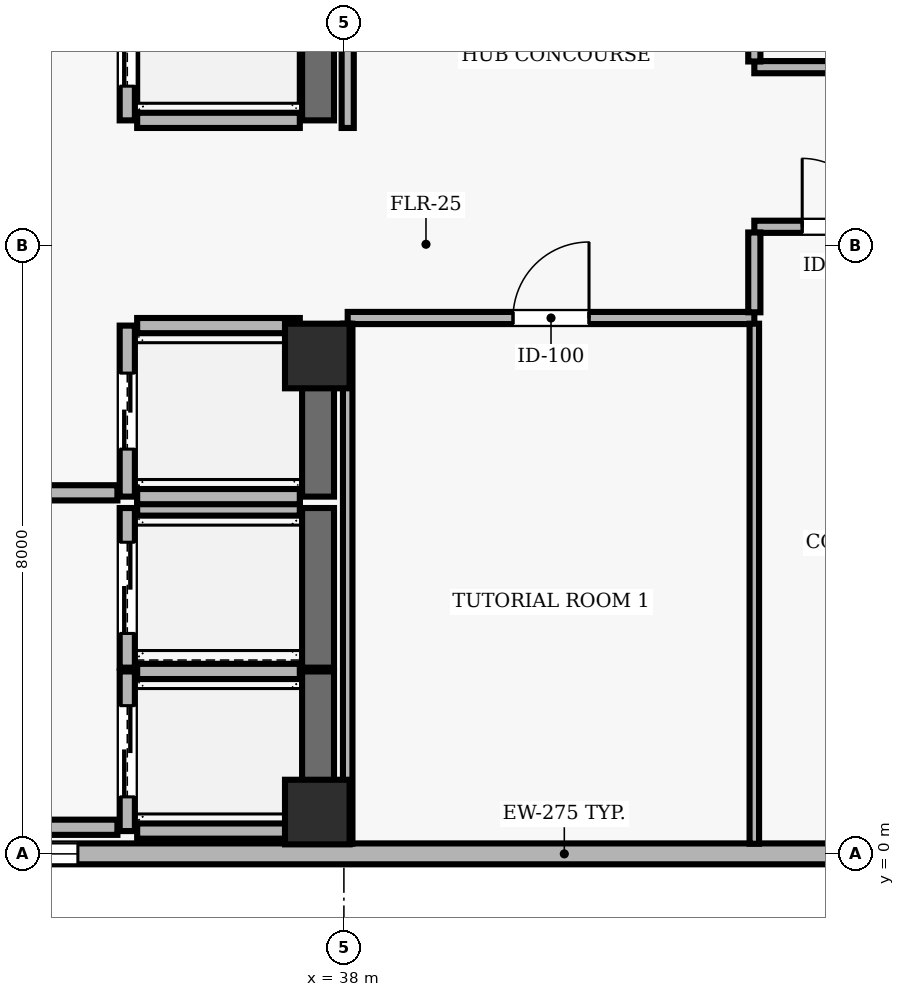
"""IFC4 building model, lengths in metres.
Left out: names, types, materials, properties, quantities, classifications, styles, units other than length and angle.
Written with IfcOpenShell. Run it as: python <this file> out.ifc"""

import sys

from ifc_helpers import new_model, si_unit, direction, frame, frame_2d, origin, origin_2d, place, context, subcontext, project, spatial, rectangle, extrude, element, fill, save


model = new_model("IFC4")
c1 = context("Model", 3, precision=1e-05, world=origin(), true_north=direction((0.0, 1.0)))
c2 = subcontext(c1, "Body", "Model", "MODEL_VIEW")
j1 = project(units=[si_unit("LENGTHUNIT", "METRE"), si_unit("PLANEANGLEUNIT", "RADIAN")], contexts=[c1])
p1 = place(None, origin())
s1 = spatial("IfcSite", under=j1, at=p1, CompositionType="ELEMENT")
p2 = place(p1, origin())
s2 = spatial("IfcBuilding", under=s1, at=p2, CompositionType="ELEMENT")
p3 = place(p2, frame((0.0, 0.0, 302.8)))
s3 = spatial("IfcBuildingStorey", under=s2, at=p3, CompositionType="ELEMENT", Elevation=302.8)
for number, where, z_axis, x_axis in (
    (1, (37.65, 0.55, 0.0), (0.0, 0.0, 1.0), (1.0, 0.0, 0.0)),
    (2, (37.65, 6.55, 0.0), (0.0, 0.0, 1.0), (1.0, 0.0, 0.0)),
):
    element("IfcColumn", number, at=place(p3, frame(where, z_axis=z_axis, x_axis=x_axis)), inside=s3, PredefinedType="COLUMN", context=c2, shape_type="SweptSolid", body=[
        extrude(rectangle(XDim=0.85, YDim=0.85, at=origin_2d()), origin(), (0.0, 0.0, 1.0), 3.9),
    ])
p4 = place(p3, frame((24.5, 0.0, 0.0), z_axis=(0.0, 0.0, 1.0), x_axis=(1.0, 0.0, 0.0)))
e3 = element("IfcWall", 3, at=p4, inside=s3, PredefinedType="SOLIDWALL", context=c2, shape_type="SweptSolid", body=[
    extrude(rectangle(XDim=32.8, YDim=0.275, at=frame_2d((16.4, 0.0))), origin(), (0.0, 0.0, 1.0), 3.64),
])
p5 = place(p4, frame((1.833, 0.0, 0.9)))
e4 = element("IfcOpeningElement", 4, at=p5, cuts=e3, PredefinedType="OPENING", context=c2, shape_type="SweptSolid", body=[
    extrude(rectangle(XDim=1.8, YDim=1.6, at=frame_2d((0.9, 0.8))), frame((0.0, 0.147, 0.0), z_axis=(0.0, -1.0, 0.0), x_axis=(1.0, 0.0, 0.0)), (0.0, 0.0, 1.0), 0.295),
])
p6 = place(p4, frame((8.2, 0.0, 0.9)))
e5 = element("IfcOpeningElement", 5, at=p6, cuts=e3, PredefinedType="OPENING", context=c2, shape_type="SweptSolid", body=[
    extrude(rectangle(XDim=1.8, YDim=1.6, at=frame_2d((0.9, 0.8))), frame((0.0, 0.147, 0.0), z_axis=(0.0, -1.0, 0.0), x_axis=(1.0, 0.0, 0.0)), (0.0, 0.0, 1.0), 0.295),
])
p7 = place(p4, frame((24.15, 0.0, 0.9)))
e6 = element("IfcOpeningElement", 6, at=p7, cuts=e3, PredefinedType="OPENING", context=c2, shape_type="SweptSolid", body=[
    extrude(rectangle(XDim=1.8, YDim=1.6, at=frame_2d((0.9, 0.8))), frame((0.0, 0.147, 0.0), z_axis=(0.0, -1.0, 0.0), x_axis=(1.0, 0.0, 0.0)), (0.0, 0.0, 1.0), 0.295),
])
p8 = place(p4, frame((29.167, 0.0, 0.9)))
e7 = element("IfcOpeningElement", 7, at=p8, cuts=e3, PredefinedType="OPENING", context=c2, shape_type="SweptSolid", body=[
    extrude(rectangle(XDim=1.8, YDim=1.6, at=frame_2d((0.9, 0.8))), frame((0.0, 0.147, 0.0), z_axis=(0.0, -1.0, 0.0), x_axis=(1.0, 0.0, 0.0)), (0.0, 0.0, 1.0), 0.295),
])
p9 = place(p3, frame((35.15, 2.4, 0.0), z_axis=(0.0, 0.0, 1.0), x_axis=(0.0, -1.0, 0.0)))
e8 = element("IfcWall", 8, at=p9, inside=s3, PredefinedType="SOLIDWALL", context=c2, shape_type="SweptSolid", body=[
    extrude(rectangle(XDim=2.1, YDim=0.2, at=frame_2d((1.05, 0.0))), origin(), (0.0, 0.0, 1.0), 3.64),
])
p10 = place(p9, frame((0.45, 0.0, 0.0)))
e9 = element("IfcOpeningElement", 9, at=p10, cuts=e8, PredefinedType="OPENING", context=c2, shape_type="SweptSolid", body=[
    extrude(rectangle(XDim=1.2, YDim=2.15, at=frame_2d((0.6, 1.075))), frame((0.0, 0.11, 0.0), z_axis=(0.0, -1.0, 0.0), x_axis=(1.0, 0.0, 0.0)), (0.0, 0.0, 1.0), 0.22),
])
p11 = place(p3, frame((37.66, 0.3, 0.0), z_axis=(0.0, 0.0, 1.0), x_axis=(0.0, 1.0, 0.0)))
e10 = element("IfcWall", 10, at=p11, inside=s3, PredefinedType="SHEAR", context=c2, shape_type="SweptSolid", body=[
    extrude(rectangle(XDim=2.1, YDim=0.42, at=frame_2d((1.05, 0.0))), origin(), (0.0, 0.0, 1.0), 3.64),
])
for number, where, z_axis, x_axis in (
    (11, (35.28, 0.3, 0.0), (0.0, 0.0, 1.0), (1.0, 0.0, 0.0)),
    (12, (37.42, 2.4, 0.0), (0.0, 0.0, 1.0), (-1.0, 0.0, 0.0)),
):
    element("IfcWall", number, at=place(p3, frame(where, z_axis=z_axis, x_axis=x_axis)), inside=s3, PredefinedType="SOLIDWALL", context=c2, shape_type="SweptSolid", body=[
        extrude(rectangle(XDim=2.14, YDim=0.2, at=frame_2d((1.07, 0.0))), origin(), (0.0, 0.0, 1.0), 3.64),
    ])
p12 = place(p3, frame((35.15, 4.55, 0.0), z_axis=(0.0, 0.0, 1.0), x_axis=(0.0, -1.0, 0.0)))
e13 = element("IfcWall", 13, at=p12, inside=s3, PredefinedType="SOLIDWALL", context=c2, shape_type="SweptSolid", body=[
    extrude(rectangle(XDim=2.1, YDim=0.2, at=frame_2d((1.05, 0.0))), origin(), (0.0, 0.0, 1.0), 3.64),
])
p13 = place(p12, frame((0.45, 0.0, 0.0)))
e14 = element("IfcOpeningElement", 14, at=p13, cuts=e13, PredefinedType="OPENING", context=c2, shape_type="SweptSolid", body=[
    extrude(rectangle(XDim=1.2, YDim=2.15, at=frame_2d((0.6, 1.075))), frame((0.0, 0.11, 0.0), z_axis=(0.0, -1.0, 0.0), x_axis=(1.0, 0.0, 0.0)), (0.0, 0.0, 1.0), 0.22),
])
p14 = place(p3, frame((37.66, 2.45, 0.0), z_axis=(0.0, 0.0, 1.0), x_axis=(0.0, 1.0, 0.0)))
e15 = element("IfcWall", 15, at=p14, inside=s3, PredefinedType="SHEAR", context=c2, shape_type="SweptSolid", body=[
    extrude(rectangle(XDim=2.1, YDim=0.42, at=frame_2d((1.05, 0.0))), origin(), (0.0, 0.0, 1.0), 3.64),
])
p15 = place(p3, frame((37.42, 4.55, 0.0), z_axis=(0.0, 0.0, 1.0), x_axis=(-1.0, 0.0, 0.0)))
e16 = element("IfcWall", 16, at=p15, inside=s3, PredefinedType="SOLIDWALL", context=c2, shape_type="SweptSolid", body=[
    extrude(rectangle(XDim=2.14, YDim=0.2, at=frame_2d((1.07, 0.0))), origin(), (0.0, 0.0, 1.0), 3.64),
])
p16 = place(p3, frame((35.15, 6.95, 0.0), z_axis=(0.0, 0.0, 1.0), x_axis=(0.0, -1.0, 0.0)))
e17 = element("IfcWall", 17, at=p16, inside=s3, PredefinedType="SOLIDWALL", context=c2, shape_type="SweptSolid", body=[
    extrude(rectangle(XDim=2.25, YDim=0.2, at=frame_2d((1.125, 0.0))), origin(), (0.0, 0.0, 1.0), 3.64),
])
p17 = place(p16, frame((0.625, 0.0, 0.0)))
e18 = element("IfcOpeningElement", 18, at=p17, cuts=e17, PredefinedType="OPENING", context=c2, shape_type="SweptSolid", body=[
    extrude(rectangle(XDim=1.0, YDim=2.1, at=frame_2d((0.5, 1.05))), frame((0.0, 0.11, 0.0), z_axis=(0.0, -1.0, 0.0), x_axis=(1.0, 0.0, 0.0)), (0.0, 0.0, 1.0), 0.22),
])
p18 = place(p3, frame((37.66, 4.7, 0.0), z_axis=(0.0, 0.0, 1.0), x_axis=(0.0, 1.0, 0.0)))
e19 = element("IfcWall", 19, at=p18, inside=s3, PredefinedType="SHEAR", context=c2, shape_type="SweptSolid", body=[
    extrude(rectangle(XDim=2.25, YDim=0.42, at=frame_2d((1.125, 0.0))), origin(), (0.0, 0.0, 1.0), 3.64),
])
for number, where, z_axis, x_axis in (
    (20, (35.28, 4.7, 0.0), (0.0, 0.0, 1.0), (1.0, 0.0, 0.0)),
    (21, (37.42, 6.95, 0.0), (0.0, 0.0, 1.0), (-1.0, 0.0, 0.0)),
):
    element("IfcWall", number, at=place(p3, frame(where, z_axis=z_axis, x_axis=x_axis)), inside=s3, PredefinedType="SOLIDWALL", context=c2, shape_type="SweptSolid", body=[
        extrude(rectangle(XDim=2.14, YDim=0.2, at=frame_2d((1.07, 0.0))), origin(), (0.0, 0.0, 1.0), 3.64),
    ])
p19 = place(p3, frame((35.15, 11.55, 0.0), z_axis=(0.0, 0.0, 1.0), x_axis=(0.0, -1.0, 0.0)))
e22 = element("IfcWall", 22, at=p19, inside=s3, PredefinedType="SOLIDWALL", context=c2, shape_type="SweptSolid", body=[
    extrude(rectangle(XDim=1.9, YDim=0.2, at=frame_2d((0.95, 0.0))), origin(), (0.0, 0.0, 1.0), 3.64),
])
p20 = place(p19, frame((0.45, 0.0, 0.0)))
e23 = element("IfcOpeningElement", 23, at=p20, cuts=e22, PredefinedType="OPENING", context=c2, shape_type="SweptSolid", body=[
    extrude(rectangle(XDim=1.0, YDim=2.1, at=frame_2d((0.5, 1.05))), frame((0.0, 0.11, 0.0), z_axis=(0.0, -1.0, 0.0), x_axis=(1.0, 0.0, 0.0)), (0.0, 0.0, 1.0), 0.22),
])
p21 = place(p3, frame((37.66, 9.65, 0.0), z_axis=(0.0, 0.0, 1.0), x_axis=(0.0, 1.0, 0.0)))
e24 = element("IfcWall", 24, at=p21, inside=s3, PredefinedType="SHEAR", context=c2, shape_type="SweptSolid", body=[
    extrude(rectangle(XDim=1.9, YDim=0.42, at=frame_2d((0.95, 0.0))), origin(), (0.0, 0.0, 1.0), 3.64),
])
p22 = place(p3, frame((35.28, 9.65, 0.0), z_axis=(0.0, 0.0, 1.0), x_axis=(1.0, 0.0, 0.0)))
e25 = element("IfcWall", 25, at=p22, inside=s3, PredefinedType="SOLIDWALL", context=c2, shape_type="SweptSolid", body=[
    extrude(rectangle(XDim=2.14, YDim=0.2, at=frame_2d((1.07, 0.0))), origin(), (0.0, 0.0, 1.0), 3.64),
])
p23 = place(p3, frame((31.65, 0.35, 0.0), z_axis=(0.0, 0.0, 1.0), x_axis=(1.0, 0.0, 0.0)))
e26 = element("IfcWall", 26, at=p23, inside=s3, PredefinedType="SOLIDWALL", context=c2, shape_type="SweptSolid", body=[
    extrude(rectangle(XDim=3.37, YDim=0.2, at=frame_2d((1.685, 0.0))), origin(), (0.0, 0.0, 1.0), 3.64),
])
p24 = place(p3, frame((35.02, 4.75, 0.0), z_axis=(0.0, 0.0, 1.0), x_axis=(-1.0, 0.0, 0.0)))
e27 = element("IfcWall", 27, at=p24, inside=s3, PredefinedType="SOLIDWALL", context=c2, shape_type="SweptSolid", body=[
    extrude(rectangle(XDim=3.11, YDim=0.2, at=frame_2d((1.555, 0.0))), origin(), (0.0, 0.0, 1.0), 3.64),
])
p25 = place(p24, frame((1.03, 0.0, 0.0)))
e28 = element("IfcOpeningElement", 28, at=p25, cuts=e27, PredefinedType="OPENING", context=c2, shape_type="SweptSolid", body=[
    extrude(rectangle(XDim=1.05, YDim=2.15, at=frame_2d((0.525, 1.075))), frame((0.0, 0.11, 0.0), z_axis=(0.0, -1.0, 0.0), x_axis=(1.0, 0.0, 0.0)), (0.0, 0.0, 1.0), 0.22),
])
p26 = place(p3, frame((38.05, 7.05, 0.0), z_axis=(0.0, 0.0, 1.0), x_axis=(1.0, 0.0, 0.0)))
e29 = element("IfcWall", 29, at=p26, inside=s3, PredefinedType="PARTITIONING", context=c2, shape_type="SweptSolid", body=[
    extrude(rectangle(XDim=5.35, YDim=0.16, at=frame_2d((2.675, 0.0))), origin(), (0.0, 0.0, 1.0), 3.64),
])
p27 = place(p26, frame((2.175, 0.0, 0.0)))
e30 = element("IfcOpeningElement", 30, at=p27, cuts=e29, PredefinedType="OPENING", context=c2, shape_type="SweptSolid", body=[
    extrude(rectangle(XDim=1.0, YDim=2.1, at=frame_2d((0.5, 1.05))), frame((0.0, 0.09, 0.0), z_axis=(0.0, -1.0, 0.0), x_axis=(1.0, 0.0, 0.0)), (0.0, 0.0, 1.0), 0.18),
])
p28 = place(p3, frame((43.4, 8.25, 0.0), z_axis=(0.0, 0.0, 1.0), x_axis=(1.0, 0.0, 0.0)))
e31 = element("IfcWall", 31, at=p28, inside=s3, PredefinedType="PARTITIONING", context=c2, shape_type="SweptSolid", body=[
    extrude(rectangle(XDim=4.26, YDim=0.16, at=frame_2d((2.13, 0.0))), origin(), (0.0, 0.0, 1.0), 3.171),
])
p29 = place(p28, frame((0.63, 0.0, 0.0)))
e32 = element("IfcOpeningElement", 32, at=p29, cuts=e31, PredefinedType="OPENING", context=c2, shape_type="SweptSolid", body=[
    extrude(rectangle(XDim=0.9, YDim=2.1, at=frame_2d((0.45, 1.05))), frame((0.0, 0.09, 0.0), z_axis=(0.0, -1.0, 0.0), x_axis=(1.0, 0.0, 0.0)), (0.0, 0.0, 1.0), 0.18),
])
p30 = place(p3, frame((47.66, 10.35, 0.0), z_axis=(0.0, 0.0, 1.0), x_axis=(-1.0, 0.0, 0.0)))
e33 = element("IfcWall", 33, at=p30, inside=s3, PredefinedType="PARTITIONING", context=c2, shape_type="SweptSolid", body=[
    extrude(rectangle(XDim=4.26, YDim=0.16, at=frame_2d((2.13, 0.0))), origin(), (0.0, 0.0, 1.0), 3.322),
])
p31 = place(p3, frame((38.05, 6.975, 0.0), z_axis=(0.0, 0.0, 1.0), x_axis=(0.0, -1.0, 0.0)))
e34 = element("IfcWall", 34, at=p31, inside=s3, PredefinedType="PARTITIONING", context=c2, shape_type="SweptSolid", body=[
    extrude(rectangle(XDim=6.842, YDim=0.125, at=frame_2d((3.421, 0.0))), origin(), (0.0, 0.0, 1.0), 3.171),
])
p32 = place(p3, frame((38.05, 15.925, 0.0), z_axis=(0.0, 0.0, 1.0), x_axis=(0.0, -1.0, 0.0)))
e35 = element("IfcWall", 35, at=p32, inside=s3, PredefinedType="PARTITIONING", context=c2, shape_type="SweptSolid", body=[
    extrude(rectangle(XDim=6.375, YDim=0.16, at=frame_2d((3.188, 0.0))), origin(), (0.0, 0.0, 1.0), 3.171),
])
p33 = place(p3, frame((43.4, 0.133, 0.0), z_axis=(0.0, 0.0, 1.0), x_axis=(0.0, 1.0, 0.0)))
e36 = element("IfcWall", 36, at=p33, inside=s3, PredefinedType="PARTITIONING", context=c2, shape_type="SweptSolid", body=[
    extrude(rectangle(XDim=6.842, YDim=0.125, at=frame_2d((3.421, 0.0))), origin(), (0.0, 0.0, 1.0), 3.64),
])
p34 = place(p3, frame((43.4, 7.125, 0.0), z_axis=(0.0, 0.0, 1.0), x_axis=(0.0, 1.0, 0.0)))
e37 = element("IfcWall", 37, at=p34, inside=s3, PredefinedType="PARTITIONING", context=c2, shape_type="SweptSolid", body=[
    extrude(rectangle(XDim=1.05, YDim=0.16, at=frame_2d((0.525, 0.0))), origin(), (0.0, 0.0, 1.0), 3.64),
])
p35 = place(p3, frame((43.4, 10.425, 0.0), z_axis=(0.0, 0.0, 1.0), x_axis=(0.0, 1.0, 0.0)))
e38 = element("IfcWall", 38, at=p35, inside=s3, PredefinedType="PARTITIONING", context=c2, shape_type="SweptSolid", body=[
    extrude(rectangle(XDim=5.5, YDim=0.16, at=frame_2d((2.75, 0.0))), origin(), (0.0, 0.0, 1.0), 3.64),
])
p36 = place(p35, frame((2.25, 0.0, 0.0)))
e39 = element("IfcOpeningElement", 39, at=p36, cuts=e38, PredefinedType="OPENING", context=c2, shape_type="SweptSolid", body=[
    extrude(rectangle(XDim=1.0, YDim=2.1, at=frame_2d((0.5, 1.05))), frame((0.0, 0.09, 0.0), z_axis=(0.0, -1.0, 0.0), x_axis=(1.0, 0.0, 0.0)), (0.0, 0.0, 1.0), 0.18),
])
p37 = place(p6, origin())
e40 = element("IfcWindow", 40, at=p37, inside=s3, PartitioningType="SINGLE_PANEL", PredefinedType="WINDOW", context=c2, shape_type="SweptSolid", body=[
    extrude(rectangle(XDim=1.8, YDim=1.6, at=frame_2d((0.9, 0.8))), frame((0.0, 0.03, 0.0), z_axis=(0.0, -1.0, 0.0), x_axis=(1.0, 0.0, 0.0)), (0.0, 0.0, 1.0), 0.06),
])
fill(e5, e40)
p38 = place(p10, origin())
e41 = element("IfcDoor", 41, at=p38, inside=s3, OperationType="DOUBLE_DOOR_SLIDING", PredefinedType="DOOR", context=c2, shape_type="SweptSolid", body=[
    extrude(rectangle(XDim=1.2, YDim=2.15, at=frame_2d((0.6, 1.075))), frame((0.0, 0.025, 0.0), z_axis=(0.0, -1.0, 0.0), x_axis=(1.0, 0.0, 0.0)), (0.0, 0.0, 1.0), 0.05),
])
fill(e9, e41)
p39 = place(p13, origin())
e42 = element("IfcDoor", 42, at=p39, inside=s3, OperationType="DOUBLE_DOOR_SLIDING", PredefinedType="DOOR", context=c2, shape_type="SweptSolid", body=[
    extrude(rectangle(XDim=1.2, YDim=2.15, at=frame_2d((0.6, 1.075))), frame((0.0, 0.025, 0.0), z_axis=(0.0, -1.0, 0.0), x_axis=(1.0, 0.0, 0.0)), (0.0, 0.0, 1.0), 0.05),
])
fill(e14, e42)
p40 = place(p17, origin())
e43 = element("IfcDoor", 43, at=p40, inside=s3, OperationType="DOUBLE_DOOR_SLIDING", PredefinedType="DOOR", context=c2, shape_type="SweptSolid", body=[
    extrude(rectangle(XDim=1.0, YDim=2.1, at=frame_2d((0.5, 1.05))), frame((0.0, 0.025, 0.0), z_axis=(0.0, -1.0, 0.0), x_axis=(1.0, 0.0, 0.0)), (0.0, 0.0, 1.0), 0.05),
])
fill(e18, e43)
p41 = place(p20, origin())
e44 = element("IfcDoor", 44, at=p41, inside=s3, OperationType="DOUBLE_DOOR_SLIDING", PredefinedType="DOOR", context=c2, shape_type="SweptSolid", body=[
    extrude(rectangle(XDim=1.0, YDim=2.1, at=frame_2d((0.5, 1.05))), frame((0.0, 0.025, 0.0), z_axis=(0.0, -1.0, 0.0), x_axis=(1.0, 0.0, 0.0)), (0.0, 0.0, 1.0), 0.05),
])
fill(e23, e44)
p42 = place(p27, origin())
e45 = element("IfcDoor", 45, at=p42, inside=s3, OperationType="SINGLE_SWING_RIGHT", PredefinedType="DOOR", context=c2, shape_type="SweptSolid", body=[
    extrude(rectangle(XDim=1.0, YDim=2.1, at=frame_2d((0.5, 1.05))), frame((0.0, 0.025, 0.0), z_axis=(0.0, -1.0, 0.0), x_axis=(1.0, 0.0, 0.0)), (0.0, 0.0, 1.0), 0.05),
])
fill(e30, e45)
p43 = place(p29, origin())
e46 = element("IfcDoor", 46, at=p43, inside=s3, OperationType="SINGLE_SWING_LEFT", PredefinedType="DOOR", context=c2, shape_type="SweptSolid", body=[
    extrude(rectangle(XDim=0.9, YDim=2.1, at=frame_2d((0.45, 1.05))), frame((0.0, 0.025, 0.0), z_axis=(0.0, -1.0, 0.0), x_axis=(1.0, 0.0, 0.0)), (0.0, 0.0, 1.0), 0.05),
])
fill(e32, e46)
save(model, sys.argv[1])
